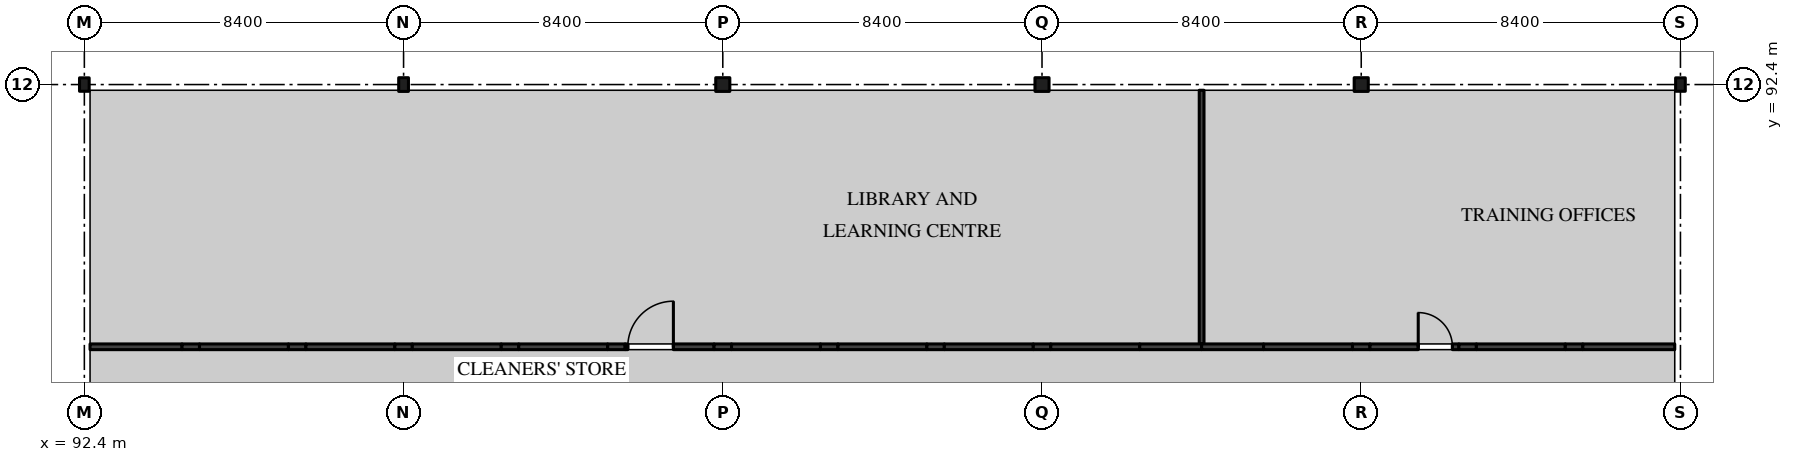
"""IFC4 building model, lengths in metres.
Left out: names, types, materials, properties, quantities, classifications, styles, units other than length and angle.
Written with IfcOpenShell. Run it as: python <this file> out.ifc"""

import sys

from ifc_helpers import new_model, si_unit, direction, frame, frame_2d, origin, origin_2d, place, context, subcontext, project, spatial, rectangle, i_section, extrude, element, fill, save


model = new_model("IFC4")
c1 = context("Model", 3, precision=1e-05, world=origin(), true_north=direction((0.0, 1.0)))
c2 = subcontext(c1, "Body", "Model", "MODEL_VIEW")
j1 = project(units=[si_unit("LENGTHUNIT", "METRE"), si_unit("PLANEANGLEUNIT", "RADIAN")], contexts=[c1])
p1 = place(None, origin())
s1 = spatial("IfcSite", under=j1, at=p1, CompositionType="ELEMENT")
p2 = place(p1, origin())
s2 = spatial("IfcBuilding", under=s1, at=p2, CompositionType="ELEMENT")
p3 = place(p2, frame((0.0, 0.0, 14.4)))
s3 = spatial("IfcBuildingStorey", under=s2, at=p3, CompositionType="ELEMENT", Elevation=14.4)
p4 = place(p3, frame((92.4, 92.4, 0.0), z_axis=(0.0, 0.0, 1.0), x_axis=(1.0, 0.0, 0.0)))
e1 = element("IfcColumn", 1, at=p4, inside=s3, PredefinedType="COLUMN", context=c2, shape_type="SweptSolid", body=[
    extrude(i_section(OverallWidth=0.254, OverallDepth=0.353, WebThickness=0.01, FlangeThickness=0.016, FilletRadius=0.015, at=origin_2d()), origin(), (0.0, 0.0, 1.0), 4.37),
])
p5 = place(p3, frame((100.8, 92.4, 0.0), z_axis=(0.0, 0.0, 1.0), x_axis=(1.0, 0.0, 0.0)))
e2 = element("IfcColumn", 2, at=p5, inside=s3, PredefinedType="COLUMN", context=c2, shape_type="SweptSolid", body=[
    extrude(i_section(OverallWidth=0.257, OverallDepth=0.361, WebThickness=0.011, FlangeThickness=0.02, FilletRadius=0.015, at=origin_2d()), origin(), (0.0, 0.0, 1.0), 4.37),
])
for number, where, z_axis, x_axis in (
    (3, (109.2, 92.4, 0.0), (0.0, 0.0, 1.0), (1.0, 0.0, 0.0)),
    (4, (117.6, 92.4, 0.0), (0.0, 0.0, 1.0), (1.0, 0.0, 0.0)),
    (5, (126.0, 92.4, 0.0), (0.0, 0.0, 1.0), (1.0, 0.0, 0.0)),
):
    element("IfcColumn", number, at=place(p3, frame(where, z_axis=z_axis, x_axis=x_axis)), inside=s3, PredefinedType="COLUMN", context=c2, shape_type="SweptSolid", body=[
        extrude(i_section(OverallWidth=0.371, OverallDepth=0.361, WebThickness=0.012, FlangeThickness=0.02, FilletRadius=0.015, at=origin_2d()), origin(), (0.0, 0.0, 1.0), 4.37),
    ])
p6 = place(p3, frame((134.4, 92.4, 0.0), z_axis=(0.0, 0.0, 1.0), x_axis=(1.0, 0.0, 0.0)))
e6 = element("IfcColumn", 6, at=p6, inside=s3, PredefinedType="COLUMN", context=c2, shape_type="SweptSolid", body=[
    extrude(i_section(OverallWidth=0.254, OverallDepth=0.353, WebThickness=0.01, FlangeThickness=0.016, FilletRadius=0.015, at=origin_2d()), origin(), (0.0, 0.0, 1.0), 4.37),
])
p7 = place(p3, frame((121.8, 85.575, 0.0), z_axis=(0.0, 0.0, 1.0), x_axis=(0.0, 1.0, 0.0)))
e7 = element("IfcWall", 7, at=p7, inside=s3, PredefinedType="PARTITIONING", context=c2, shape_type="SweptSolid", body=[
    extrude(rectangle(XDim=6.675, YDim=0.125, at=frame_2d((3.337, 0.0))), origin(), (0.0, 0.0, 1.0), 4.37),
])
p8 = place(p3, frame((92.55, 85.5, 0.0), z_axis=(0.0, 0.0, 1.0), x_axis=(1.0, 0.0, 0.0)))
e8 = element("IfcWall", 8, at=p8, inside=s3, PredefinedType="PARTITIONING", context=c2, shape_type="SweptSolid", body=[
    extrude(rectangle(XDim=2.42, YDim=0.15, at=frame_2d((1.21, 0.0))), origin(), (0.0, 0.0, 1.0), 4.37),
])
p9 = place(p3, frame((94.97, 85.5, 0.0), z_axis=(0.0, 0.0, 1.0), x_axis=(1.0, 0.0, 0.0)))
e9 = element("IfcWall", 9, at=p9, inside=s3, PredefinedType="PARTITIONING", context=c2, shape_type="SweptSolid", body=[
    extrude(rectangle(XDim=0.46, YDim=0.15, at=frame_2d((0.23, 0.0))), origin(), (0.0, 0.0, 1.0), 3.895),
])
p10 = place(p3, frame((95.43, 85.5, 0.0), z_axis=(0.0, 0.0, 1.0), x_axis=(1.0, 0.0, 0.0)))
e10 = element("IfcWall", 10, at=p10, inside=s3, PredefinedType="PARTITIONING", context=c2, shape_type="SweptSolid", body=[
    extrude(rectangle(XDim=2.34, YDim=0.15, at=frame_2d((1.17, 0.0))), origin(), (0.0, 0.0, 1.0), 4.37),
])
p11 = place(p3, frame((97.77, 85.5, 0.0), z_axis=(0.0, 0.0, 1.0), x_axis=(1.0, 0.0, 0.0)))
e11 = element("IfcWall", 11, at=p11, inside=s3, PredefinedType="PARTITIONING", context=c2, shape_type="SweptSolid", body=[
    extrude(rectangle(XDim=0.46, YDim=0.15, at=frame_2d((0.23, 0.0))), origin(), (0.0, 0.0, 1.0), 3.895),
])
p12 = place(p3, frame((98.23, 85.5, 0.0), z_axis=(0.0, 0.0, 1.0), x_axis=(1.0, 0.0, 0.0)))
e12 = element("IfcWall", 12, at=p12, inside=s3, PredefinedType="PARTITIONING", context=c2, shape_type="SweptSolid", body=[
    extrude(rectangle(XDim=2.34, YDim=0.15, at=frame_2d((1.17, 0.0))), origin(), (0.0, 0.0, 1.0), 4.37),
])
p13 = place(p3, frame((100.57, 85.5, 0.0), z_axis=(0.0, 0.0, 1.0), x_axis=(1.0, 0.0, 0.0)))
e13 = element("IfcWall", 13, at=p13, inside=s3, PredefinedType="PARTITIONING", context=c2, shape_type="SweptSolid", body=[
    extrude(rectangle(XDim=0.46, YDim=0.15, at=frame_2d((0.23, 0.0))), origin(), (0.0, 0.0, 1.0), 3.746),
])
p14 = place(p3, frame((101.03, 85.5, 0.0), z_axis=(0.0, 0.0, 1.0), x_axis=(1.0, 0.0, 0.0)))
e14 = element("IfcWall", 14, at=p14, inside=s3, PredefinedType="PARTITIONING", context=c2, shape_type="SweptSolid", body=[
    extrude(rectangle(XDim=2.34, YDim=0.15, at=frame_2d((1.17, 0.0))), origin(), (0.0, 0.0, 1.0), 4.37),
])
p15 = place(p3, frame((103.37, 85.5, 0.0), z_axis=(0.0, 0.0, 1.0), x_axis=(1.0, 0.0, 0.0)))
e15 = element("IfcWall", 15, at=p15, inside=s3, PredefinedType="PARTITIONING", context=c2, shape_type="SweptSolid", body=[
    extrude(rectangle(XDim=0.46, YDim=0.15, at=frame_2d((0.23, 0.0))), origin(), (0.0, 0.0, 1.0), 3.895),
])
p16 = place(p3, frame((103.83, 85.5, 0.0), z_axis=(0.0, 0.0, 1.0), x_axis=(1.0, 0.0, 0.0)))
e16 = element("IfcWall", 16, at=p16, inside=s3, PredefinedType="PARTITIONING", context=c2, shape_type="SweptSolid", body=[
    extrude(rectangle(XDim=2.34, YDim=0.15, at=frame_2d((1.17, 0.0))), origin(), (0.0, 0.0, 1.0), 4.37),
])
p17 = place(p3, frame((106.17, 85.5, 0.0), z_axis=(0.0, 0.0, 1.0), x_axis=(1.0, 0.0, 0.0)))
e17 = element("IfcWall", 17, at=p17, inside=s3, PredefinedType="PARTITIONING", context=c2, shape_type="SweptSolid", body=[
    extrude(rectangle(XDim=0.46, YDim=0.15, at=frame_2d((0.23, 0.0))), origin(), (0.0, 0.0, 1.0), 3.895),
])
p18 = place(p3, frame((106.63, 85.5, 0.0), z_axis=(0.0, 0.0, 1.0), x_axis=(1.0, 0.0, 0.0)))
e18 = element("IfcWall", 18, at=p18, inside=s3, PredefinedType="PARTITIONING", context=c2, shape_type="SweptSolid", body=[
    extrude(rectangle(XDim=2.34, YDim=0.15, at=frame_2d((1.17, 0.0))), origin(), (0.0, 0.0, 1.0), 4.37),
])
p19 = place(p18, frame((0.07, 0.0, 0.0)))
e19 = element("IfcOpeningElement", 19, at=p19, cuts=e18, PredefinedType="OPENING", context=c2, shape_type="SweptSolid", body=[
    extrude(rectangle(XDim=1.2, YDim=2.4, at=frame_2d((0.6, 1.2))), frame((0.0, 0.085, 0.0), z_axis=(0.0, -1.0, 0.0), x_axis=(1.0, 0.0, 0.0)), (0.0, 0.0, 1.0), 0.17),
])
p20 = place(p3, frame((108.97, 85.5, 0.0), z_axis=(0.0, 0.0, 1.0), x_axis=(1.0, 0.0, 0.0)))
e20 = element("IfcWall", 20, at=p20, inside=s3, PredefinedType="PARTITIONING", context=c2, shape_type="SweptSolid", body=[
    extrude(rectangle(XDim=0.46, YDim=0.15, at=frame_2d((0.23, 0.0))), origin(), (0.0, 0.0, 1.0), 3.746),
])
p21 = place(p3, frame((109.43, 85.5, 0.0), z_axis=(0.0, 0.0, 1.0), x_axis=(1.0, 0.0, 0.0)))
e21 = element("IfcWall", 21, at=p21, inside=s3, PredefinedType="PARTITIONING", context=c2, shape_type="SweptSolid", body=[
    extrude(rectangle(XDim=2.34, YDim=0.15, at=frame_2d((1.17, 0.0))), origin(), (0.0, 0.0, 1.0), 4.37),
])
p22 = place(p3, frame((111.77, 85.5, 0.0), z_axis=(0.0, 0.0, 1.0), x_axis=(1.0, 0.0, 0.0)))
e22 = element("IfcWall", 22, at=p22, inside=s3, PredefinedType="PARTITIONING", context=c2, shape_type="SweptSolid", body=[
    extrude(rectangle(XDim=0.46, YDim=0.15, at=frame_2d((0.23, 0.0))), origin(), (0.0, 0.0, 1.0), 3.895),
])
p23 = place(p3, frame((112.23, 85.5, 0.0), z_axis=(0.0, 0.0, 1.0), x_axis=(1.0, 0.0, 0.0)))
e23 = element("IfcWall", 23, at=p23, inside=s3, PredefinedType="PARTITIONING", context=c2, shape_type="SweptSolid", body=[
    extrude(rectangle(XDim=2.34, YDim=0.15, at=frame_2d((1.17, 0.0))), origin(), (0.0, 0.0, 1.0), 4.37),
])
p24 = place(p3, frame((114.57, 85.5, 0.0), z_axis=(0.0, 0.0, 1.0), x_axis=(1.0, 0.0, 0.0)))
e24 = element("IfcWall", 24, at=p24, inside=s3, PredefinedType="PARTITIONING", context=c2, shape_type="SweptSolid", body=[
    extrude(rectangle(XDim=0.46, YDim=0.15, at=frame_2d((0.23, 0.0))), origin(), (0.0, 0.0, 1.0), 3.895),
])
p25 = place(p3, frame((115.03, 85.5, 0.0), z_axis=(0.0, 0.0, 1.0), x_axis=(1.0, 0.0, 0.0)))
e25 = element("IfcWall", 25, at=p25, inside=s3, PredefinedType="PARTITIONING", context=c2, shape_type="SweptSolid", body=[
    extrude(rectangle(XDim=2.34, YDim=0.15, at=frame_2d((1.17, 0.0))), origin(), (0.0, 0.0, 1.0), 4.37),
])
p26 = place(p3, frame((117.37, 85.5, 0.0), z_axis=(0.0, 0.0, 1.0), x_axis=(1.0, 0.0, 0.0)))
e26 = element("IfcWall", 26, at=p26, inside=s3, PredefinedType="PARTITIONING", context=c2, shape_type="SweptSolid", body=[
    extrude(rectangle(XDim=0.46, YDim=0.15, at=frame_2d((0.23, 0.0))), origin(), (0.0, 0.0, 1.0), 3.746),
])
p27 = place(p3, frame((117.83, 85.5, 0.0), z_axis=(0.0, 0.0, 1.0), x_axis=(1.0, 0.0, 0.0)))
e27 = element("IfcWall", 27, at=p27, inside=s3, PredefinedType="PARTITIONING", context=c2, shape_type="SweptSolid", body=[
    extrude(rectangle(XDim=2.34, YDim=0.15, at=frame_2d((1.17, 0.0))), origin(), (0.0, 0.0, 1.0), 4.37),
])
p28 = place(p3, frame((120.17, 85.5, 0.0), z_axis=(0.0, 0.0, 1.0), x_axis=(1.0, 0.0, 0.0)))
e28 = element("IfcWall", 28, at=p28, inside=s3, PredefinedType="PARTITIONING", context=c2, shape_type="SweptSolid", body=[
    extrude(rectangle(XDim=1.63, YDim=0.15, at=frame_2d((0.815, 0.0))), origin(), (0.0, 0.0, 1.0), 3.895),
])
p29 = place(p3, frame((121.8, 85.5, 0.0), z_axis=(0.0, 0.0, 1.0), x_axis=(1.0, 0.0, 0.0)))
e29 = element("IfcWall", 29, at=p29, inside=s3, PredefinedType="PARTITIONING", context=c2, shape_type="SweptSolid", body=[
    extrude(rectangle(XDim=1.63, YDim=0.15, at=frame_2d((0.815, 0.0))), origin(), (0.0, 0.0, 1.0), 3.895),
])
p30 = place(p3, frame((123.43, 85.5, 0.0), z_axis=(0.0, 0.0, 1.0), x_axis=(1.0, 0.0, 0.0)))
e30 = element("IfcWall", 30, at=p30, inside=s3, PredefinedType="PARTITIONING", context=c2, shape_type="SweptSolid", body=[
    extrude(rectangle(XDim=2.34, YDim=0.15, at=frame_2d((1.17, 0.0))), origin(), (0.0, 0.0, 1.0), 4.37),
])
p31 = place(p3, frame((125.77, 85.5, 0.0), z_axis=(0.0, 0.0, 1.0), x_axis=(1.0, 0.0, 0.0)))
e31 = element("IfcWall", 31, at=p31, inside=s3, PredefinedType="PARTITIONING", context=c2, shape_type="SweptSolid", body=[
    extrude(rectangle(XDim=0.46, YDim=0.15, at=frame_2d((0.23, 0.0))), origin(), (0.0, 0.0, 1.0), 3.746),
])
p32 = place(p3, frame((126.23, 85.5, 0.0), z_axis=(0.0, 0.0, 1.0), x_axis=(1.0, 0.0, 0.0)))
e32 = element("IfcWall", 32, at=p32, inside=s3, PredefinedType="PARTITIONING", context=c2, shape_type="SweptSolid", body=[
    extrude(rectangle(XDim=2.34, YDim=0.15, at=frame_2d((1.17, 0.0))), origin(), (0.0, 0.0, 1.0), 4.37),
])
p33 = place(p32, frame((1.27, 0.0, 0.0)))
e33 = element("IfcOpeningElement", 33, at=p33, cuts=e32, PredefinedType="OPENING", context=c2, shape_type="SweptSolid", body=[
    extrude(rectangle(XDim=0.9, YDim=2.1, at=frame_2d((0.45, 1.05))), frame((0.0, 0.085, 0.0), z_axis=(0.0, -1.0, 0.0), x_axis=(1.0, 0.0, 0.0)), (0.0, 0.0, 1.0), 0.17),
])
p34 = place(p3, frame((128.57, 85.5, 0.0), z_axis=(0.0, 0.0, 1.0), x_axis=(1.0, 0.0, 0.0)))
e34 = element("IfcWall", 34, at=p34, inside=s3, PredefinedType="PARTITIONING", context=c2, shape_type="SweptSolid", body=[
    extrude(rectangle(XDim=0.46, YDim=0.15, at=frame_2d((0.23, 0.0))), origin(), (0.0, 0.0, 1.0), 3.895),
])
p35 = place(p3, frame((129.03, 85.5, 0.0), z_axis=(0.0, 0.0, 1.0), x_axis=(1.0, 0.0, 0.0)))
e35 = element("IfcWall", 35, at=p35, inside=s3, PredefinedType="PARTITIONING", context=c2, shape_type="SweptSolid", body=[
    extrude(rectangle(XDim=2.34, YDim=0.15, at=frame_2d((1.17, 0.0))), origin(), (0.0, 0.0, 1.0), 4.37),
])
p36 = place(p3, frame((131.37, 85.5, 0.0), z_axis=(0.0, 0.0, 1.0), x_axis=(1.0, 0.0, 0.0)))
e36 = element("IfcWall", 36, at=p36, inside=s3, PredefinedType="PARTITIONING", context=c2, shape_type="SweptSolid", body=[
    extrude(rectangle(XDim=0.46, YDim=0.15, at=frame_2d((0.23, 0.0))), origin(), (0.0, 0.0, 1.0), 3.895),
])
p37 = place(p3, frame((131.83, 85.5, 0.0), z_axis=(0.0, 0.0, 1.0), x_axis=(1.0, 0.0, 0.0)))
e37 = element("IfcWall", 37, at=p37, inside=s3, PredefinedType="PARTITIONING", context=c2, shape_type="SweptSolid", body=[
    extrude(rectangle(XDim=2.42, YDim=0.15, at=frame_2d((1.21, 0.0))), origin(), (0.0, 0.0, 1.0), 4.37),
])
p38 = place(p19, origin())
e38 = element("IfcDoor", 38, at=p38, inside=s3, OperationType="SINGLE_SWING_LEFT", PredefinedType="DOOR", context=c2, shape_type="SweptSolid", body=[
    extrude(rectangle(XDim=1.2, YDim=2.4, at=frame_2d((0.6, 1.2))), frame((0.0, 0.025, 0.0), z_axis=(0.0, -1.0, 0.0), x_axis=(1.0, 0.0, 0.0)), (0.0, 0.0, 1.0), 0.05),
])
fill(e19, e38)
p39 = place(p33, origin())
e39 = element("IfcDoor", 39, at=p39, inside=s3, OperationType="SINGLE_SWING_RIGHT", PredefinedType="DOOR", context=c2, shape_type="SweptSolid", body=[
    extrude(rectangle(XDim=0.9, YDim=2.1, at=frame_2d((0.45, 1.05))), frame((0.0, 0.025, 0.0), z_axis=(0.0, -1.0, 0.0), x_axis=(1.0, 0.0, 0.0)), (0.0, 0.0, 1.0), 0.05),
])
fill(e33, e39)
save(model, sys.argv[1])
